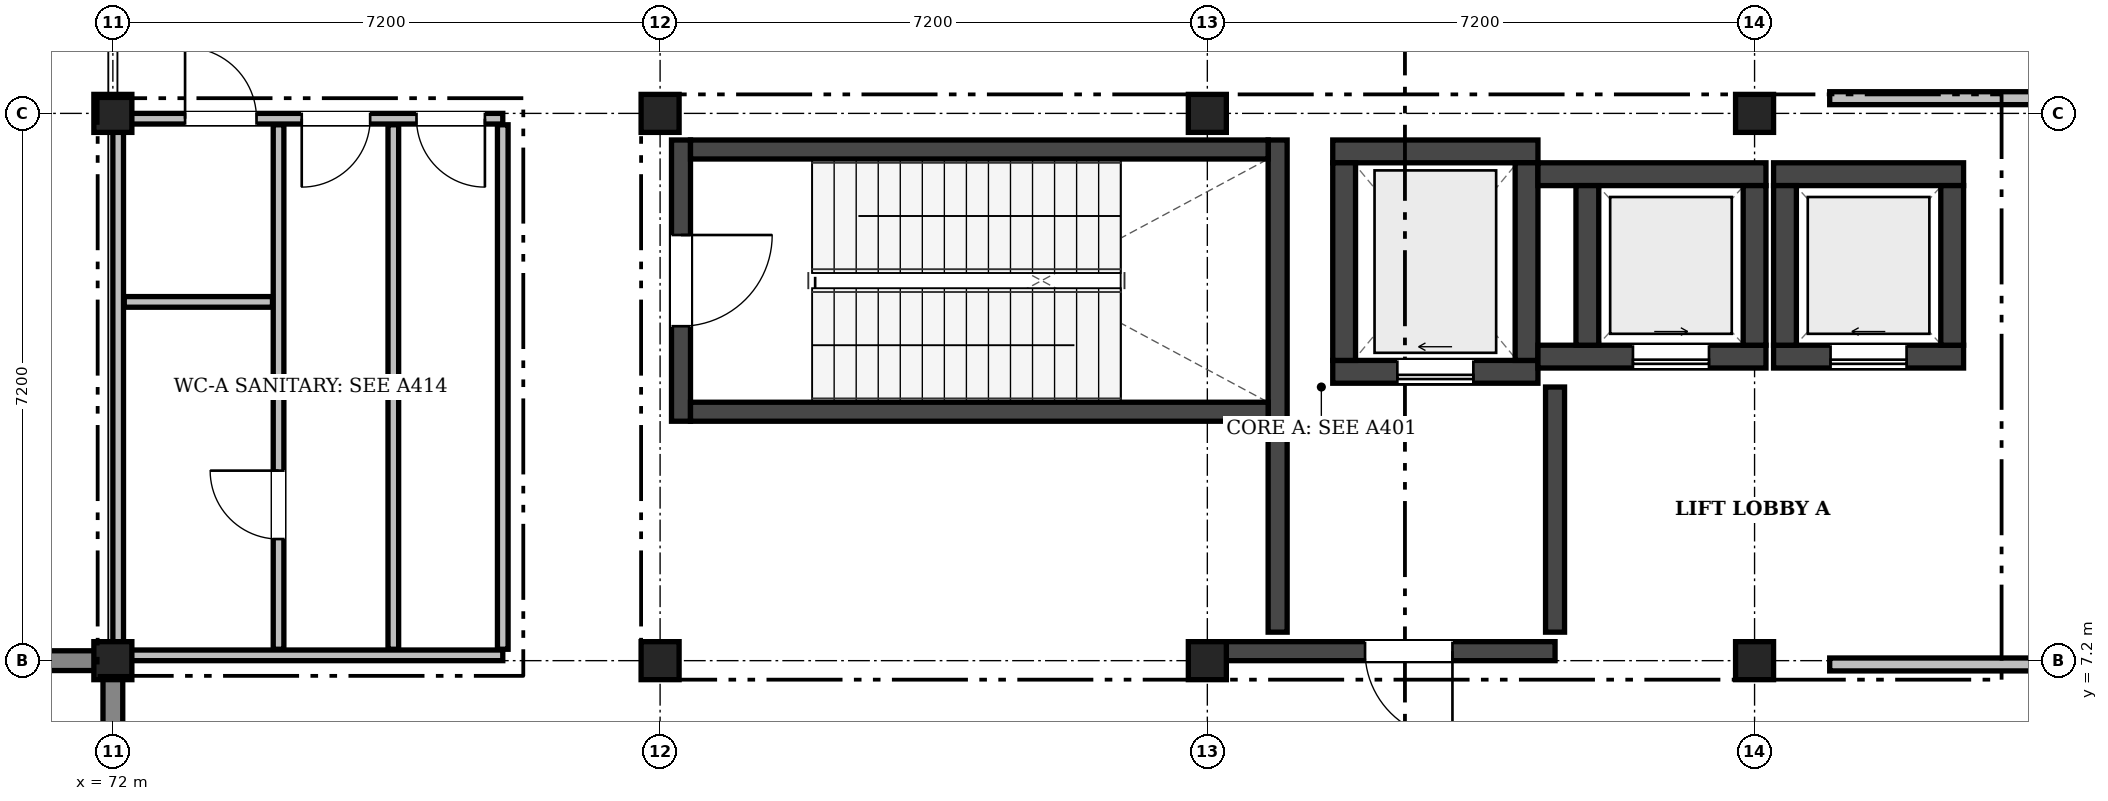
"""IFC4 building model, lengths in metres.
Left out: names, types, materials, properties, quantities, classifications, styles, units other than length and angle.
Written with IfcOpenShell. Run it as: python <this file> out.ifc"""

import sys

from ifc_helpers import new_model, si_unit, direction, frame, frame_2d, origin, origin_2d, place, context, subcontext, project, spatial, rectangle, extrude, element, fill, save


model = new_model("IFC4")
c1 = context("Model", 3, precision=1e-05, world=origin(), true_north=direction((0.0, 1.0)))
c2 = subcontext(c1, "Body", "Model", "MODEL_VIEW")
j1 = project(units=[si_unit("LENGTHUNIT", "METRE"), si_unit("PLANEANGLEUNIT", "RADIAN")], contexts=[c1])
p1 = place(None, origin())
s1 = spatial("IfcSite", under=j1, at=p1, CompositionType="ELEMENT")
p2 = place(p1, origin())
s2 = spatial("IfcBuilding", under=s1, at=p2, CompositionType="ELEMENT")
p3 = place(p2, frame((0.0, 0.0, 32.4)))
s3 = spatial("IfcBuildingStorey", under=s2, at=p3, CompositionType="ELEMENT", Elevation=32.4)
for number, where, z_axis, x_axis in (
    (1, (72.0, 7.2, 0.0), (0.0, 0.0, 1.0), (1.0, 0.0, 0.0)),
    (2, (72.0, 14.4, 0.0), (0.0, 0.0, 1.0), (1.0, 0.0, 0.0)),
    (3, (79.2, 7.2, 0.0), (0.0, 0.0, 1.0), (1.0, 0.0, 0.0)),
    (4, (79.2, 14.4, 0.0), (0.0, 0.0, 1.0), (1.0, 0.0, 0.0)),
    (5, (86.4, 7.2, 0.0), (0.0, 0.0, 1.0), (1.0, 0.0, 0.0)),
    (6, (86.4, 14.4, 0.0), (0.0, 0.0, 1.0), (1.0, 0.0, 0.0)),
    (7, (93.6, 7.2, 0.0), (0.0, 0.0, 1.0), (1.0, 0.0, 0.0)),
    (8, (93.6, 14.4, 0.0), (0.0, 0.0, 1.0), (1.0, 0.0, 0.0)),
):
    element("IfcColumn", number, at=place(p3, frame(where, z_axis=z_axis, x_axis=x_axis)), inside=s3, PredefinedType="COLUMN", context=c2, shape_type="SweptSolid", body=[
        extrude(rectangle(XDim=0.5, YDim=0.5, at=origin_2d()), origin(), (0.0, 0.0, 1.0), 4.5),
    ])
p4 = place(p3, frame((72.0, 3.752, 0.0), z_axis=(0.0, 0.0, 1.0), x_axis=(0.0, 1.0, 0.0)))
e9 = element("IfcWall", 9, at=p4, inside=s3, PredefinedType="SOLIDWALL", context=c2, shape_type="SweptSolid", body=[
    extrude(rectangle(XDim=3.296, YDim=0.26, at=frame_2d((1.648, 0.0))), origin(), (0.0, 0.0, 1.0), 4.22),
])
p5 = place(p3, frame((72.15, 7.2, 0.0), z_axis=(0.0, 0.0, 1.0), x_axis=(-1.0, 0.0, 0.0)))
e10 = element("IfcWall", 10, at=p5, inside=s3, PredefinedType="SOLIDWALL", context=c2, shape_type="SweptSolid", body=[
    extrude(rectangle(XDim=7.35, YDim=0.26, at=frame_2d((3.675, 0.0))), origin(), (0.0, 0.0, 1.0), 4.22),
])
p6 = place(p5, frame((2.325, 0.0, 0.95)))
e11 = element("IfcOpeningElement", 11, at=p6, cuts=e10, PredefinedType="OPENING", context=c2, shape_type="SweptSolid", body=[
    extrude(rectangle(XDim=2.7, YDim=1.3, at=frame_2d((1.35, 0.65))), frame((0.0, 0.142, 0.0), z_axis=(0.0, -1.0, 0.0), x_axis=(1.0, 0.0, 0.0)), (0.0, 0.0, 1.0), 0.284),
])
p7 = place(p3, frame((88.05, 11.0, 0.0), z_axis=(0.0, 0.0, 1.0), x_axis=(1.0, 0.0, 0.0)))
e12 = element("IfcWall", 12, at=p7, inside=s3, PredefinedType="SHEAR", context=c2, shape_type="SweptSolid", body=[
    extrude(rectangle(XDim=2.7, YDim=0.3, at=frame_2d((1.35, 0.0))), origin(), (0.0, 0.0, 1.0), 4.25),
])
p8 = place(p7, frame((0.85, 0.0, 0.0)))
e13 = element("IfcOpeningElement", 13, at=p8, cuts=e12, PredefinedType="OPENING", context=c2, shape_type="SweptSolid", body=[
    extrude(rectangle(XDim=1.0, YDim=2.1, at=frame_2d((0.5, 1.05))), frame((0.0, 0.162, 0.0), z_axis=(0.0, -1.0, 0.0), x_axis=(1.0, 0.0, 0.0)), (0.0, 0.0, 1.0), 0.324),
])
p9 = place(p3, frame((88.05, 13.9, 0.0), z_axis=(0.0, 0.0, 1.0), x_axis=(1.0, 0.0, 0.0)))
e14 = element("IfcWall", 14, at=p9, inside=s3, PredefinedType="SHEAR", context=c2, shape_type="SweptSolid", body=[
    extrude(rectangle(XDim=2.7, YDim=0.3, at=frame_2d((1.35, 0.0))), origin(), (0.0, 0.0, 1.0), 4.25),
])
for number, where, z_axis, x_axis in (
    (15, (88.2, 11.15, 0.0), (0.0, 0.0, 1.0), (0.0, 1.0, 0.0)),
    (16, (90.6, 11.15, 0.0), (0.0, 0.0, 1.0), (0.0, 1.0, 0.0)),
):
    element("IfcWall", number, at=place(p3, frame(where, z_axis=z_axis, x_axis=x_axis)), inside=s3, PredefinedType="SHEAR", context=c2, shape_type="SweptSolid", body=[
        extrude(rectangle(XDim=2.6, YDim=0.3, at=frame_2d((1.3, 0.0))), origin(), (0.0, 0.0, 1.0), 4.25),
    ])
p10 = place(p3, frame((90.75, 11.2, 0.0), z_axis=(0.0, 0.0, 1.0), x_axis=(1.0, 0.0, 0.0)))
e17 = element("IfcWall", 17, at=p10, inside=s3, PredefinedType="SHEAR", context=c2, shape_type="SweptSolid", body=[
    extrude(rectangle(XDim=3.0, YDim=0.3, at=frame_2d((1.5, 0.0))), origin(), (0.0, 0.0, 1.0), 4.25),
])
p11 = place(p10, frame((1.25, 0.0, 0.0)))
e18 = element("IfcOpeningElement", 18, at=p11, cuts=e17, PredefinedType="OPENING", context=c2, shape_type="SweptSolid", body=[
    extrude(rectangle(XDim=1.0, YDim=2.1, at=frame_2d((0.5, 1.05))), frame((0.0, 0.162, 0.0), z_axis=(0.0, -1.0, 0.0), x_axis=(1.0, 0.0, 0.0)), (0.0, 0.0, 1.0), 0.324),
])
p12 = place(p3, frame((90.75, 13.6, 0.0), z_axis=(0.0, 0.0, 1.0), x_axis=(1.0, 0.0, 0.0)))
e19 = element("IfcWall", 19, at=p12, inside=s3, PredefinedType="SHEAR", context=c2, shape_type="SweptSolid", body=[
    extrude(rectangle(XDim=3.0, YDim=0.3, at=frame_2d((1.5, 0.0))), origin(), (0.0, 0.0, 1.0), 4.25),
])
for number, where, z_axis, x_axis in (
    (20, (91.4, 11.35, 0.0), (0.0, 0.0, 1.0), (0.0, 1.0, 0.0)),
    (21, (93.6, 11.35, 0.0), (0.0, 0.0, 1.0), (0.0, 1.0, 0.0)),
):
    element("IfcWall", number, at=place(p3, frame(where, z_axis=z_axis, x_axis=x_axis)), inside=s3, PredefinedType="SHEAR", context=c2, shape_type="SweptSolid", body=[
        extrude(rectangle(XDim=2.1, YDim=0.3, at=frame_2d((1.05, 0.0))), origin(), (0.0, 0.0, 1.0), 4.25),
    ])
p13 = place(p3, frame((93.85, 11.2, 0.0), z_axis=(0.0, 0.0, 1.0), x_axis=(1.0, 0.0, 0.0)))
e22 = element("IfcWall", 22, at=p13, inside=s3, PredefinedType="SHEAR", context=c2, shape_type="SweptSolid", body=[
    extrude(rectangle(XDim=2.5, YDim=0.3, at=frame_2d((1.25, 0.0))), origin(), (0.0, 0.0, 1.0), 4.25),
])
p14 = place(p13, frame((0.75, 0.0, 0.0)))
e23 = element("IfcOpeningElement", 23, at=p14, cuts=e22, PredefinedType="OPENING", context=c2, shape_type="SweptSolid", body=[
    extrude(rectangle(XDim=1.0, YDim=2.1, at=frame_2d((0.5, 1.05))), frame((0.0, 0.162, 0.0), z_axis=(0.0, -1.0, 0.0), x_axis=(1.0, 0.0, 0.0)), (0.0, 0.0, 1.0), 0.324),
])
p15 = place(p3, frame((93.85, 13.6, 0.0), z_axis=(0.0, 0.0, 1.0), x_axis=(1.0, 0.0, 0.0)))
e24 = element("IfcWall", 24, at=p15, inside=s3, PredefinedType="SHEAR", context=c2, shape_type="SweptSolid", body=[
    extrude(rectangle(XDim=2.5, YDim=0.3, at=frame_2d((1.25, 0.0))), origin(), (0.0, 0.0, 1.0), 4.25),
])
for number, where, z_axis, x_axis in (
    (25, (94.0, 11.35, 0.0), (0.0, 0.0, 1.0), (0.0, 1.0, 0.0)),
    (26, (96.2, 11.35, 0.0), (0.0, 0.0, 1.0), (0.0, 1.0, 0.0)),
):
    element("IfcWall", number, at=place(p3, frame(where, z_axis=z_axis, x_axis=x_axis)), inside=s3, PredefinedType="SHEAR", context=c2, shape_type="SweptSolid", body=[
        extrude(rectangle(XDim=2.1, YDim=0.3, at=frame_2d((1.05, 0.0))), origin(), (0.0, 0.0, 1.0), 4.25),
    ])
p16 = place(p3, frame((79.475, 10.35, 0.0), z_axis=(0.0, 0.0, 1.0), x_axis=(0.0, 1.0, 0.0)))
e27 = element("IfcWall", 27, at=p16, inside=s3, PredefinedType="SHEAR", context=c2, shape_type="SweptSolid", body=[
    extrude(rectangle(XDim=3.7, YDim=0.25, at=frame_2d((1.85, 0.0))), origin(), (0.0, 0.0, 1.0), 4.25),
])
p17 = place(p16, frame((1.25, 0.0, 0.0)))
e28 = element("IfcOpeningElement", 28, at=p17, cuts=e27, PredefinedType="OPENING", context=c2, shape_type="SweptSolid", body=[
    extrude(rectangle(XDim=1.2, YDim=2.15, at=frame_2d((0.6, 1.075))), frame((0.0, 0.137, 0.0), z_axis=(0.0, -1.0, 0.0), x_axis=(1.0, 0.0, 0.0)), (0.0, 0.0, 1.0), 0.274),
])
p18 = place(p3, frame((87.325, 10.35, 0.0), z_axis=(0.0, 0.0, 1.0), x_axis=(0.0, 1.0, 0.0)))
e29 = element("IfcWall", 29, at=p18, inside=s3, PredefinedType="SHEAR", context=c2, shape_type="SweptSolid", body=[
    extrude(rectangle(XDim=3.7, YDim=0.25, at=frame_2d((1.85, 0.0))), origin(), (0.0, 0.0, 1.0), 4.25),
])
for number, where, z_axis, x_axis in (
    (30, (79.6, 10.475, 0.0), (0.0, 0.0, 1.0), (1.0, 0.0, 0.0)),
    (31, (79.6, 13.925, 0.0), (0.0, 0.0, 1.0), (1.0, 0.0, 0.0)),
):
    element("IfcWall", number, at=place(p3, frame(where, z_axis=z_axis, x_axis=x_axis)), inside=s3, PredefinedType="SHEAR", context=c2, shape_type="SweptSolid", body=[
        extrude(rectangle(XDim=7.6, YDim=0.25, at=frame_2d((3.8, 0.0))), origin(), (0.0, 0.0, 1.0), 4.25),
    ])
p19 = place(p3, frame((86.65, 7.325, 0.0), z_axis=(0.0, 0.0, 1.0), x_axis=(1.0, 0.0, 0.0)))
e32 = element("IfcWall", 32, at=p19, inside=s3, PredefinedType="SHEAR", context=c2, shape_type="SweptSolid", body=[
    extrude(rectangle(XDim=4.325, YDim=0.25, at=frame_2d((2.163, 0.0))), origin(), (0.0, 0.0, 1.0), 4.25),
])
p20 = place(p19, frame((1.825, 0.0, 0.0)))
e33 = element("IfcOpeningElement", 33, at=p20, cuts=e32, PredefinedType="OPENING", context=c2, shape_type="SweptSolid", body=[
    extrude(rectangle(XDim=1.15, YDim=2.15, at=frame_2d((0.575, 1.075))), frame((0.0, 0.137, 0.0), z_axis=(0.0, -1.0, 0.0), x_axis=(1.0, 0.0, 0.0)), (0.0, 0.0, 1.0), 0.274),
])
p21 = place(p3, frame((87.325, 7.575, 0.0), z_axis=(0.0, 0.0, 1.0), x_axis=(0.0, 1.0, 0.0)))
e34 = element("IfcWall", 34, at=p21, inside=s3, PredefinedType="SHEAR", context=c2, shape_type="SweptSolid", body=[
    extrude(rectangle(XDim=2.77, YDim=0.25, at=frame_2d((1.385, 0.0))), origin(), (0.0, 0.0, 1.0), 4.25),
])
p22 = place(p3, frame((90.975, 7.575, 0.0), z_axis=(0.0, 0.0, 1.0), x_axis=(0.0, 1.0, 0.0)))
e35 = element("IfcWall", 35, at=p22, inside=s3, PredefinedType="SHEAR", context=c2, shape_type="SweptSolid", body=[
    extrude(rectangle(XDim=3.225, YDim=0.25, at=frame_2d((1.613, 0.0))), origin(), (0.0, 0.0, 1.0), 4.25),
])
p23 = place(p3, frame((72.07, 7.27, 0.0), z_axis=(0.0, 0.0, 1.0), x_axis=(1.0, 0.0, 0.0)))
e36 = element("IfcWall", 36, at=p23, inside=s3, PredefinedType="PARTITIONING", context=c2, shape_type="SweptSolid", body=[
    extrude(rectangle(XDim=5.06, YDim=0.14, at=frame_2d((2.53, 0.0))), origin(), (0.0, 0.0, 1.0), 3.78),
])
p24 = place(p3, frame((72.07, 14.33, 0.0), z_axis=(0.0, 0.0, 1.0), x_axis=(1.0, 0.0, 0.0)))
e37 = element("IfcWall", 37, at=p24, inside=s3, PredefinedType="PARTITIONING", context=c2, shape_type="SweptSolid", body=[
    extrude(rectangle(XDim=5.06, YDim=0.14, at=frame_2d((2.53, 0.0))), origin(), (0.0, 0.0, 1.0), 3.78),
])
p25 = place(p24, frame((0.88, 0.0, 0.0)))
e38 = element("IfcOpeningElement", 38, at=p25, cuts=e37, PredefinedType="OPENING", context=c2, shape_type="SweptSolid", body=[
    extrude(rectangle(XDim=0.94, YDim=2.1, at=frame_2d((0.47, 1.05))), frame((0.0, 0.082, 0.0), z_axis=(0.0, -1.0, 0.0), x_axis=(1.0, 0.0, 0.0)), (0.0, 0.0, 1.0), 0.164),
])
p26 = place(p24, frame((2.415, 0.0, 0.0)))
e39 = element("IfcOpeningElement", 39, at=p26, cuts=e37, PredefinedType="OPENING", context=c2, shape_type="SweptSolid", body=[
    extrude(rectangle(XDim=0.9, YDim=2.08, at=frame_2d((0.45, 1.04))), frame((0.0, 0.082, 0.0), z_axis=(0.0, -1.0, 0.0), x_axis=(1.0, 0.0, 0.0)), (0.0, 0.0, 1.0), 0.164),
])
p27 = place(p24, frame((3.925, 0.0, 0.0)))
e40 = element("IfcOpeningElement", 40, at=p27, cuts=e37, PredefinedType="OPENING", context=c2, shape_type="SweptSolid", body=[
    extrude(rectangle(XDim=0.9, YDim=2.08, at=frame_2d((0.45, 1.04))), frame((0.0, 0.082, 0.0), z_axis=(0.0, -1.0, 0.0), x_axis=(1.0, 0.0, 0.0)), (0.0, 0.0, 1.0), 0.164),
])
p28 = place(p3, frame((72.07, 7.35, 0.0), z_axis=(0.0, 0.0, 1.0), x_axis=(0.0, 1.0, 0.0)))
e41 = element("IfcWall", 41, at=p28, inside=s3, PredefinedType="PARTITIONING", context=c2, shape_type="SweptSolid", body=[
    extrude(rectangle(XDim=6.9, YDim=0.14, at=frame_2d((3.45, 0.0))), origin(), (0.0, 0.0, 1.0), 3.78),
])
p29 = place(p3, frame((77.13, 7.35, 0.0), z_axis=(0.0, 0.0, 1.0), x_axis=(0.0, 1.0, 0.0)))
e42 = element("IfcWall", 42, at=p29, inside=s3, PredefinedType="PARTITIONING", context=c2, shape_type="SweptSolid", body=[
    extrude(rectangle(XDim=6.9, YDim=0.14, at=frame_2d((3.45, 0.0))), origin(), (0.0, 0.0, 1.0), 4.16),
])
p30 = place(p3, frame((74.18, 7.35, 0.0), z_axis=(0.0, 0.0, 1.0), x_axis=(0.0, 1.0, 0.0)))
e43 = element("IfcWall", 43, at=p30, inside=s3, PredefinedType="PARTITIONING", context=c2, shape_type="SweptSolid", body=[
    extrude(rectangle(XDim=6.9, YDim=0.14, at=frame_2d((3.45, 0.0))), origin(), (0.0, 0.0, 1.0), 4.16),
])
p31 = place(p30, frame((1.45, 0.0, 0.0)))
e44 = element("IfcOpeningElement", 44, at=p31, cuts=e43, PredefinedType="OPENING", context=c2, shape_type="SweptSolid", body=[
    extrude(rectangle(XDim=0.9, YDim=2.08, at=frame_2d((0.45, 1.04))), frame((0.0, 0.082, 0.0), z_axis=(0.0, -1.0, 0.0), x_axis=(1.0, 0.0, 0.0)), (0.0, 0.0, 1.0), 0.164),
])
p32 = place(p3, frame((75.69, 7.35, 0.0), z_axis=(0.0, 0.0, 1.0), x_axis=(0.0, 1.0, 0.0)))
e45 = element("IfcWall", 45, at=p32, inside=s3, PredefinedType="PARTITIONING", context=c2, shape_type="SweptSolid", body=[
    extrude(rectangle(XDim=6.9, YDim=0.14, at=frame_2d((3.45, 0.0))), origin(), (0.0, 0.0, 1.0), 4.16),
])
p33 = place(p3, frame((72.15, 11.92, 0.0), z_axis=(0.0, 0.0, 1.0), x_axis=(1.0, 0.0, 0.0)))
e46 = element("IfcWall", 46, at=p33, inside=s3, PredefinedType="PARTITIONING", context=c2, shape_type="SweptSolid", body=[
    extrude(rectangle(XDim=1.95, YDim=0.14, at=frame_2d((0.975, 0.0))), origin(), (0.0, 0.0, 1.0), 4.16),
])
for number, where, z_axis, x_axis in (
    (47, (94.588, 14.6, 0.0), (0.0, 0.0, 1.0), (1.0, 0.0, 0.0)),
    (48, (94.588, 7.15, 0.0), (0.0, 0.0, 1.0), (1.0, 0.0, 0.0)),
):
    element("IfcWall", number, at=place(p3, frame(where, z_axis=z_axis, x_axis=x_axis)), inside=s3, PredefinedType="PARTITIONING", context=c2, shape_type="SweptSolid", body=[
        extrude(rectangle(XDim=6.07, YDim=0.17, at=frame_2d((3.035, 0.0))), origin(), (0.0, 0.0, 1.0), 3.78),
    ])
p34 = place(p8, frame((1.0, 0.0, 0.0), z_axis=(0.0, 0.0, 1.0), x_axis=(-1.0, 0.0, 0.0)))
e49 = element("IfcDoor", 49, at=p34, inside=s3, OperationType="SLIDING_TO_LEFT", PredefinedType="DOOR", context=c2, shape_type="SweptSolid", body=[
    extrude(rectangle(XDim=1.0, YDim=2.1, at=frame_2d((0.5, 1.05))), frame((0.0, 0.025, 0.0), z_axis=(0.0, -1.0, 0.0), x_axis=(1.0, 0.0, 0.0)), (0.0, 0.0, 1.0), 0.05),
])
fill(e13, e49)
p35 = place(p11, frame((1.0, 0.0, 0.0), z_axis=(0.0, 0.0, 1.0), x_axis=(-1.0, 0.0, 0.0)))
e50 = element("IfcDoor", 50, at=p35, inside=s3, OperationType="SLIDING_TO_RIGHT", PredefinedType="DOOR", context=c2, shape_type="SweptSolid", body=[
    extrude(rectangle(XDim=1.0, YDim=2.1, at=frame_2d((0.5, 1.05))), frame((0.0, 0.025, 0.0), z_axis=(0.0, -1.0, 0.0), x_axis=(1.0, 0.0, 0.0)), (0.0, 0.0, 1.0), 0.05),
])
fill(e18, e50)
p36 = place(p14, frame((1.0, 0.0, 0.0), z_axis=(0.0, 0.0, 1.0), x_axis=(-1.0, 0.0, 0.0)))
e51 = element("IfcDoor", 51, at=p36, inside=s3, OperationType="SLIDING_TO_LEFT", PredefinedType="DOOR", context=c2, shape_type="SweptSolid", body=[
    extrude(rectangle(XDim=1.0, YDim=2.1, at=frame_2d((0.5, 1.05))), frame((0.0, 0.025, 0.0), z_axis=(0.0, -1.0, 0.0), x_axis=(1.0, 0.0, 0.0)), (0.0, 0.0, 1.0), 0.05),
])
fill(e23, e51)
p37 = place(p17, frame((1.2, 0.0, 0.0), z_axis=(0.0, 0.0, 1.0), x_axis=(-1.0, 0.0, 0.0)))
e52 = element("IfcDoor", 52, at=p37, inside=s3, OperationType="SINGLE_SWING_LEFT", PredefinedType="DOOR", context=c2, shape_type="SweptSolid", body=[
    extrude(rectangle(XDim=1.2, YDim=2.15, at=frame_2d((0.6, 1.075))), frame((0.0, 0.025, 0.0), z_axis=(0.0, -1.0, 0.0), x_axis=(1.0, 0.0, 0.0)), (0.0, 0.0, 1.0), 0.05),
])
fill(e28, e52)
p38 = place(p20, frame((1.15, 0.0, 0.0), z_axis=(0.0, 0.0, 1.0), x_axis=(-1.0, 0.0, 0.0)))
e53 = element("IfcDoor", 53, at=p38, inside=s3, OperationType="SINGLE_SWING_LEFT", PredefinedType="DOOR", context=c2, shape_type="SweptSolid", body=[
    extrude(rectangle(XDim=1.15, YDim=2.15, at=frame_2d((0.575, 1.075))), frame((0.0, 0.025, 0.0), z_axis=(0.0, -1.0, 0.0), x_axis=(1.0, 0.0, 0.0)), (0.0, 0.0, 1.0), 0.05),
])
fill(e33, e53)
p39 = place(p25, origin())
e54 = element("IfcDoor", 54, at=p39, inside=s3, OperationType="SINGLE_SWING_LEFT", PredefinedType="DOOR", context=c2, shape_type="SweptSolid", body=[
    extrude(rectangle(XDim=0.94, YDim=2.1, at=frame_2d((0.47, 1.05))), frame((0.0, 0.025, 0.0), z_axis=(0.0, -1.0, 0.0), x_axis=(1.0, 0.0, 0.0)), (0.0, 0.0, 1.0), 0.05),
])
fill(e38, e54)
p40 = place(p26, frame((0.9, 0.0, 0.0), z_axis=(0.0, 0.0, 1.0), x_axis=(-1.0, 0.0, 0.0)))
e55 = element("IfcDoor", 55, at=p40, inside=s3, OperationType="SINGLE_SWING_RIGHT", PredefinedType="DOOR", context=c2, shape_type="SweptSolid", body=[
    extrude(rectangle(XDim=0.9, YDim=2.08, at=frame_2d((0.45, 1.04))), frame((0.0, 0.025, 0.0), z_axis=(0.0, -1.0, 0.0), x_axis=(1.0, 0.0, 0.0)), (0.0, 0.0, 1.0), 0.05),
])
fill(e39, e55)
p41 = place(p27, frame((0.9, 0.0, 0.0), z_axis=(0.0, 0.0, 1.0), x_axis=(-1.0, 0.0, 0.0)))
e56 = element("IfcDoor", 56, at=p41, inside=s3, OperationType="SINGLE_SWING_LEFT", PredefinedType="DOOR", context=c2, shape_type="SweptSolid", body=[
    extrude(rectangle(XDim=0.9, YDim=2.08, at=frame_2d((0.45, 1.04))), frame((0.0, 0.025, 0.0), z_axis=(0.0, -1.0, 0.0), x_axis=(1.0, 0.0, 0.0)), (0.0, 0.0, 1.0), 0.05),
])
fill(e40, e56)
p42 = place(p31, origin())
e57 = element("IfcDoor", 57, at=p42, inside=s3, OperationType="SINGLE_SWING_RIGHT", PredefinedType="DOOR", context=c2, shape_type="SweptSolid", body=[
    extrude(rectangle(XDim=0.9, YDim=2.08, at=frame_2d((0.45, 1.04))), frame((0.0, 0.025, 0.0), z_axis=(0.0, -1.0, 0.0), x_axis=(1.0, 0.0, 0.0)), (0.0, 0.0, 1.0), 0.05),
])
fill(e44, e57)
save(model, sys.argv[1])
